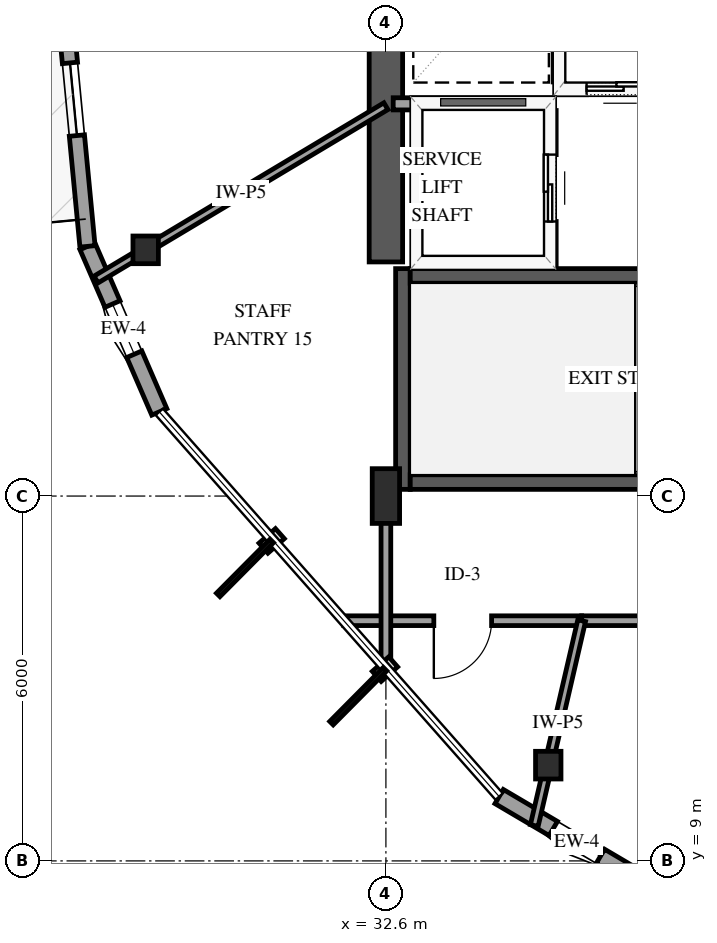
"""IFC4 building model, lengths in metres.
Left out: names, types, materials, properties, quantities, classifications, styles, units other than length and angle.
Written with IfcOpenShell. Run it as: python <this file> out.ifc"""

import sys

from ifc_helpers import new_model, si_unit, direction, frame, frame_2d, origin, origin_2d, place, context, subcontext, project, spatial, rectangle, i_section, extrude, element, fill, save


model = new_model("IFC4")
c1 = context("Model", 3, precision=1e-05, world=origin(), true_north=direction((0.0, 1.0)))
c2 = subcontext(c1, "Body", "Model", "MODEL_VIEW")
j1 = project(units=[si_unit("LENGTHUNIT", "METRE"), si_unit("PLANEANGLEUNIT", "RADIAN")], contexts=[c1])
p1 = place(None, origin())
s1 = spatial("IfcSite", under=j1, at=p1, CompositionType="ELEMENT")
p2 = place(p1, origin())
s2 = spatial("IfcBuilding", under=s1, at=p2, CompositionType="ELEMENT")
p3 = place(p2, frame((0.0, 0.0, 118.6)))
s3 = spatial("IfcBuildingStorey", under=s2, at=p3, CompositionType="ELEMENT", Elevation=118.6)
p4 = place(p3, frame((32.88, 15.11, 0.0), z_axis=(0.0, 0.0, 1.0), x_axis=(0.0, 1.0, 0.0)))
e1 = element("IfcWall", 1, at=p4, inside=s3, PredefinedType="SHEAR", context=c2, shape_type="SweptSolid", body=[
    extrude(rectangle(XDim=3.63, YDim=0.24, at=frame_2d((1.815, 0.0))), origin(), (0.0, 0.0, 1.0), 3.9),
])
for number, where, z_axis, x_axis in (
    (2, (33.0, 15.23, 0.0), (0.0, 0.0, 1.0), (1.0, 0.0, 0.0)),
    (3, (33.0, 18.62, 0.0), (0.0, 0.0, 1.0), (1.0, 0.0, 0.0)),
):
    element("IfcWall", number, at=place(p3, frame(where, z_axis=z_axis, x_axis=x_axis)), inside=s3, PredefinedType="SHEAR", context=c2, shape_type="SweptSolid", body=[
        extrude(rectangle(XDim=8.0, YDim=0.24, at=frame_2d((4.0, 0.0))), origin(), (0.0, 0.0, 1.0), 3.9),
    ])
p5 = place(p3, frame((32.6, 18.85, 0.0), z_axis=(0.0, 0.0, 1.0), x_axis=(0.0, 1.0, 0.0)))
e4 = element("IfcWall", 4, at=p5, inside=s3, PredefinedType="SHEAR", context=c2, shape_type="SweptSolid", body=[
    extrude(rectangle(XDim=12.3, YDim=0.55, at=frame_2d((6.15, 0.0))), origin(), (0.0, 0.0, 1.0), 3.9),
])
p6 = place(p3, frame((32.6, 15.0, 0.0), z_axis=(0.0, 0.0, 1.0), x_axis=(1.0, 0.0, 0.0)))
e5 = element("IfcColumn", 5, at=p6, inside=s3, PredefinedType="PILASTER", context=c2, shape_type="SweptSolid", body=[
    extrude(rectangle(XDim=0.45, YDim=0.9, at=origin_2d()), origin(), (0.0, 0.0, 1.0), 3.9),
])
for number, where, z_axis, x_axis in (
    (6, (28.649, 19.049, 0.0), (0.0, 0.0, 1.0), (1.0, 0.0, 0.0)),
    (7, (35.27, 10.575, 0.0), (0.0, 0.0, 1.0), (1.0, 0.0, 0.0)),
):
    element("IfcColumn", number, at=place(p3, frame(where, z_axis=z_axis, x_axis=x_axis)), inside=s3, PredefinedType="COLUMN", context=c2, shape_type="SweptSolid", body=[
        extrude(i_section(OverallWidth=0.418, OverallDepth=0.455, WebThickness=0.042, FlangeThickness=0.068, FilletRadius=0.038, at=origin_2d()), origin(), (0.0, 0.0, 1.0), 3.9),
    ])
p7 = place(p3, frame((27.692, 19.106, 0.0), z_axis=(0.0, 0.0, 1.0), x_axis=(0.398166294024, -0.917313252004, 0.0)))
e8 = element("IfcWall", 8, at=p7, inside=s3, PredefinedType="SOLIDWALL", context=c2, shape_type="SweptSolid", body=[
    extrude(rectangle(XDim=2.967, YDim=0.27, at=frame_2d((1.483, 0.0))), origin(), (0.0, 0.0, 1.0), 2.979),
])
p8 = place(p7, frame((1.033, 0.0, 0.75)))
e9 = element("IfcOpeningElement", 9, at=p8, cuts=e8, PredefinedType="OPENING", context=c2, shape_type="SweptSolid", body=[
    extrude(rectangle(XDim=0.9, YDim=1.5, at=frame_2d((0.45, 0.75))), frame((0.0, 0.145, 0.0), z_axis=(0.0, -1.0, 0.0), x_axis=(1.0, 0.0, 0.0)), (0.0, 0.0, 1.0), 0.29),
])
p9 = place(p3, frame((26.889, 27.509, 0.0), z_axis=(0.0, 0.0, 1.0), x_axis=(0.095124369878, -0.99546539581, 0.0)))
e10 = element("IfcWall", 10, at=p9, inside=s3, PredefinedType="SOLIDWALL", context=c2, shape_type="SweptSolid", body=[
    extrude(rectangle(XDim=8.441, YDim=0.25, at=frame_2d((4.221, 0.0))), origin(), (0.0, 0.0, 1.0), 2.979),
])
p10 = place(p9, frame((3.721, 0.0, 0.0)))
e11 = element("IfcOpeningElement", 11, at=p10, cuts=e10, PredefinedType="OPENING", context=c2, shape_type="SweptSolid", body=[
    extrude(rectangle(XDim=1.05, YDim=2.15, at=frame_2d((0.525, 1.075))), frame((0.0, 0.135, 0.0), z_axis=(0.0, -1.0, 0.0), x_axis=(1.0, 0.0, 0.0)), (0.0, 0.0, 1.0), 0.27),
])
p11 = place(p9, frame((0.44, 0.0, 0.72)))
e12 = element("IfcOpeningElement", 12, at=p11, cuts=e10, PredefinedType="OPENING", context=c2, shape_type="SweptSolid", body=[
    extrude(rectangle(XDim=1.2, YDim=1.6, at=frame_2d((0.6, 0.8))), frame((0.0, 0.135, 0.0), z_axis=(0.0, -1.0, 0.0), x_axis=(1.0, 0.0, 0.0)), (0.0, 0.0, 1.0), 0.27),
])
p12 = place(p9, frame((5.411, 0.0, 0.72)))
e13 = element("IfcOpeningElement", 13, at=p12, cuts=e10, PredefinedType="OPENING", context=c2, shape_type="SweptSolid", body=[
    extrude(rectangle(XDim=1.2, YDim=1.6, at=frame_2d((0.6, 0.8))), frame((0.0, 0.135, 0.0), z_axis=(0.0, -1.0, 0.0), x_axis=(1.0, 0.0, 0.0)), (0.0, 0.0, 1.0), 0.27),
])
p13 = place(p3, frame((34.462, 10.058, 0.0), z_axis=(0.0, 0.0, 1.0), x_axis=(0.861303111476, -0.508091478144, 0.0)))
e14 = element("IfcWall", 14, at=p13, inside=s3, PredefinedType="SOLIDWALL", context=c2, shape_type="SweptSolid", body=[
    extrude(rectangle(XDim=2.967, YDim=0.27, at=frame_2d((1.483, 0.0))), origin(), (0.0, 0.0, 1.0), 2.979),
])
p14 = place(p13, frame((1.033, 0.0, 0.75)))
e15 = element("IfcOpeningElement", 15, at=p14, cuts=e14, PredefinedType="OPENING", context=c2, shape_type="SweptSolid", body=[
    extrude(rectangle(XDim=0.9, YDim=1.5, at=frame_2d((0.45, 0.75))), frame((0.0, 0.145, 0.0), z_axis=(0.0, -1.0, 0.0), x_axis=(1.0, 0.0, 0.0)), (0.0, 0.0, 1.0), 0.29),
])
p15 = place(p3, frame((35.45, 21.7, 0.0), z_axis=(0.0, 0.0, 1.0), x_axis=(1.0, 0.0, 0.0)))
e16 = element("IfcWall", 16, at=p15, inside=s3, PredefinedType="SOLIDWALL", context=c2, shape_type="SweptSolid", body=[
    extrude(rectangle(XDim=2.0, YDim=0.2, at=frame_2d((1.0, 0.0))), origin(), (0.0, 0.0, 1.0), 3.6),
])
p16 = place(p15, frame((0.45, 0.0, 0.0)))
e17 = element("IfcOpeningElement", 17, at=p16, cuts=e16, PredefinedType="OPENING", context=c2, shape_type="SweptSolid", body=[
    extrude(rectangle(XDim=1.1, YDim=2.15, at=frame_2d((0.55, 1.075))), frame((0.0, 0.11, 0.0), z_axis=(0.0, -1.0, 0.0), x_axis=(1.0, 0.0, 0.0)), (0.0, 0.0, 1.0), 0.22),
])
p17 = place(p3, frame((35.45, 21.81, 0.0), z_axis=(0.0, 0.0, 1.0), x_axis=(0.0, 1.0, 0.0)))
e18 = element("IfcWall", 18, at=p17, inside=s3, PredefinedType="SOLIDWALL", context=c2, shape_type="SweptSolid", body=[
    extrude(rectangle(XDim=2.38, YDim=0.2, at=frame_2d((1.19, 0.0))), origin(), (0.0, 0.0, 1.0), 3.6),
])
p18 = place(p3, frame((32.72, 21.45, 0.0), z_axis=(0.0, 0.0, 1.0), x_axis=(1.0, 0.0, 0.0)))
e19 = element("IfcWall", 19, at=p18, inside=s3, PredefinedType="SOLIDWALL", context=c2, shape_type="SweptSolid", body=[
    extrude(rectangle(XDim=2.58, YDim=0.2, at=frame_2d((1.29, 0.0))), origin(), (0.0, 0.0, 1.0), 2.974),
])
p19 = place(p3, frame((35.3, 18.79, 0.0), z_axis=(0.0, 0.0, 1.0), x_axis=(0.0, 1.0, 0.0)))
e20 = element("IfcWall", 20, at=p19, inside=s3, PredefinedType="SOLIDWALL", context=c2, shape_type="SweptSolid", body=[
    extrude(rectangle(XDim=2.55, YDim=0.2, at=frame_2d((1.275, 0.0))), origin(), (0.0, 0.0, 1.0), 3.6),
])
p20 = place(p19, frame((0.725, 0.0, 0.0)))
e21 = element("IfcOpeningElement", 21, at=p20, cuts=e20, PredefinedType="OPENING", context=c2, shape_type="SweptSolid", body=[
    extrude(rectangle(XDim=1.1, YDim=2.15, at=frame_2d((0.55, 1.075))), frame((0.0, 0.11, 0.0), z_axis=(0.0, -1.0, 0.0), x_axis=(1.0, 0.0, 0.0)), (0.0, 0.0, 1.0), 0.22),
])
p21 = place(p3, frame((43.455, 12.95, 0.0), z_axis=(0.0, 0.0, 1.0), x_axis=(-1.0, 0.0, 0.0)))
e22 = element("IfcWall", 22, at=p21, inside=s3, PredefinedType="PARTITIONING", context=c2, shape_type="SweptSolid", body=[
    extrude(rectangle(XDim=7.636, YDim=0.16, at=frame_2d((3.818, 0.0))), origin(), (0.0, 0.0, 1.0), 3.6),
])
p22 = place(p21, frame((3.343, 0.0, 0.0)))
e23 = element("IfcOpeningElement", 23, at=p22, cuts=e22, PredefinedType="OPENING", context=c2, shape_type="SweptSolid", body=[
    extrude(rectangle(XDim=0.95, YDim=2.15, at=frame_2d((0.475, 1.075))), frame((0.0, 0.09, 0.0), z_axis=(0.0, -1.0, 0.0), x_axis=(1.0, 0.0, 0.0)), (0.0, 0.0, 1.0), 0.18),
])
p23 = place(p3, frame((32.6, 21.411, 0.0), z_axis=(0.0, 0.0, 1.0), x_axis=(-0.858317966337, -0.513118181965, 0.0)))
e24 = element("IfcWall", 24, at=p23, inside=s3, PredefinedType="PARTITIONING", context=c2, shape_type="SweptSolid", body=[
    extrude(rectangle(XDim=5.554, YDim=0.13, at=frame_2d((2.777, 0.0))), origin(), (0.0, 0.0, 1.0), 2.978),
])
p24 = place(p3, frame((35.819, 12.95, 0.0), z_axis=(0.0, 0.0, 1.0), x_axis=(-1.0, 0.0, 0.0)))
e25 = element("IfcWall", 25, at=p24, inside=s3, PredefinedType="PARTITIONING", context=c2, shape_type="SweptSolid", body=[
    extrude(rectangle(XDim=3.911, YDim=0.16, at=frame_2d((1.956, 0.0))), origin(), (0.0, 0.0, 1.0), 3.6),
])
p25 = place(p24, frame((1.481, 0.0, 0.0)))
e26 = element("IfcOpeningElement", 26, at=p25, cuts=e25, PredefinedType="OPENING", context=c2, shape_type="SweptSolid", body=[
    extrude(rectangle(XDim=0.95, YDim=2.15, at=frame_2d((0.475, 1.075))), frame((0.0, 0.09, 0.0), z_axis=(0.0, -1.0, 0.0), x_axis=(1.0, 0.0, 0.0)), (0.0, 0.0, 1.0), 0.18),
])
p26 = place(p3, frame((35.819, 12.95, 0.0), z_axis=(0.0, 0.0, 1.0), x_axis=(-0.225364962309, -0.974274413994, 0.0)))
e27 = element("IfcWall", 27, at=p26, inside=s3, PredefinedType="PARTITIONING", context=c2, shape_type="SweptSolid", body=[
    extrude(rectangle(XDim=3.457, YDim=0.13, at=frame_2d((1.729, 0.0))), origin(), (0.0, 0.0, 1.0), 2.895),
])
p27 = place(p3, frame((32.6, 12.167, 0.0), z_axis=(0.0, 0.0, 1.0), x_axis=(0.0, 1.0, 0.0)))
e28 = element("IfcWall", 28, at=p27, inside=s3, PredefinedType="PARTITIONING", context=c2, shape_type="SweptSolid", body=[
    extrude(rectangle(XDim=2.763, YDim=0.16, at=frame_2d((1.381, 0.0))), origin(), (0.0, 0.0, 1.0), 3.6),
])
p28 = place(p8, origin())
e29 = element("IfcWindow", 29, at=p28, inside=s3, PartitioningType="SINGLE_PANEL", PredefinedType="WINDOW", context=c2, shape_type="SweptSolid", body=[
    extrude(rectangle(XDim=0.9, YDim=1.5, at=frame_2d((0.45, 0.75))), frame((0.0, 0.03, 0.0), z_axis=(0.0, -1.0, 0.0), x_axis=(1.0, 0.0, 0.0)), (0.0, 0.0, 1.0), 0.06),
])
fill(e9, e29)
p29 = place(p12, origin())
e30 = element("IfcWindow", 30, at=p29, inside=s3, PartitioningType="SINGLE_PANEL", PredefinedType="WINDOW", context=c2, shape_type="SweptSolid", body=[
    extrude(rectangle(XDim=1.2, YDim=1.6, at=frame_2d((0.6, 0.8))), frame((0.0, 0.03, 0.0), z_axis=(0.0, -1.0, 0.0), x_axis=(1.0, 0.0, 0.0)), (0.0, 0.0, 1.0), 0.06),
])
fill(e13, e30)
p30 = place(p14, origin())
e31 = element("IfcWindow", 31, at=p30, inside=s3, PartitioningType="SINGLE_PANEL", PredefinedType="WINDOW", context=c2, shape_type="SweptSolid", body=[
    extrude(rectangle(XDim=0.9, YDim=1.5, at=frame_2d((0.45, 0.75))), frame((0.0, 0.03, 0.0), z_axis=(0.0, -1.0, 0.0), x_axis=(1.0, 0.0, 0.0)), (0.0, 0.0, 1.0), 0.06),
])
fill(e15, e31)
p31 = place(p16, origin())
e32 = element("IfcDoor", 32, at=p31, inside=s3, OperationType="SLIDING_TO_LEFT", PredefinedType="DOOR", context=c2, shape_type="SweptSolid", body=[
    extrude(rectangle(XDim=1.1, YDim=2.15, at=frame_2d((0.55, 1.075))), frame((0.0, 0.025, 0.0), z_axis=(0.0, -1.0, 0.0), x_axis=(1.0, 0.0, 0.0)), (0.0, 0.0, 1.0), 0.05),
])
fill(e17, e32)
p32 = place(p20, origin())
e33 = element("IfcDoor", 33, at=p32, inside=s3, OperationType="SLIDING_TO_LEFT", PredefinedType="DOOR", context=c2, shape_type="SweptSolid", body=[
    extrude(rectangle(XDim=1.1, YDim=2.15, at=frame_2d((0.55, 1.075))), frame((0.0, 0.025, 0.0), z_axis=(0.0, -1.0, 0.0), x_axis=(1.0, 0.0, 0.0)), (0.0, 0.0, 1.0), 0.05),
])
fill(e21, e33)
p33 = place(p25, origin())
e34 = element("IfcDoor", 34, at=p33, inside=s3, OperationType="SINGLE_SWING_RIGHT", PredefinedType="DOOR", context=c2, shape_type="SweptSolid", body=[
    extrude(rectangle(XDim=0.95, YDim=2.15, at=frame_2d((0.475, 1.075))), frame((0.0, 0.025, 0.0), z_axis=(0.0, -1.0, 0.0), x_axis=(1.0, 0.0, 0.0)), (0.0, 0.0, 1.0), 0.05),
])
fill(e26, e34)
save(model, sys.argv[1])
